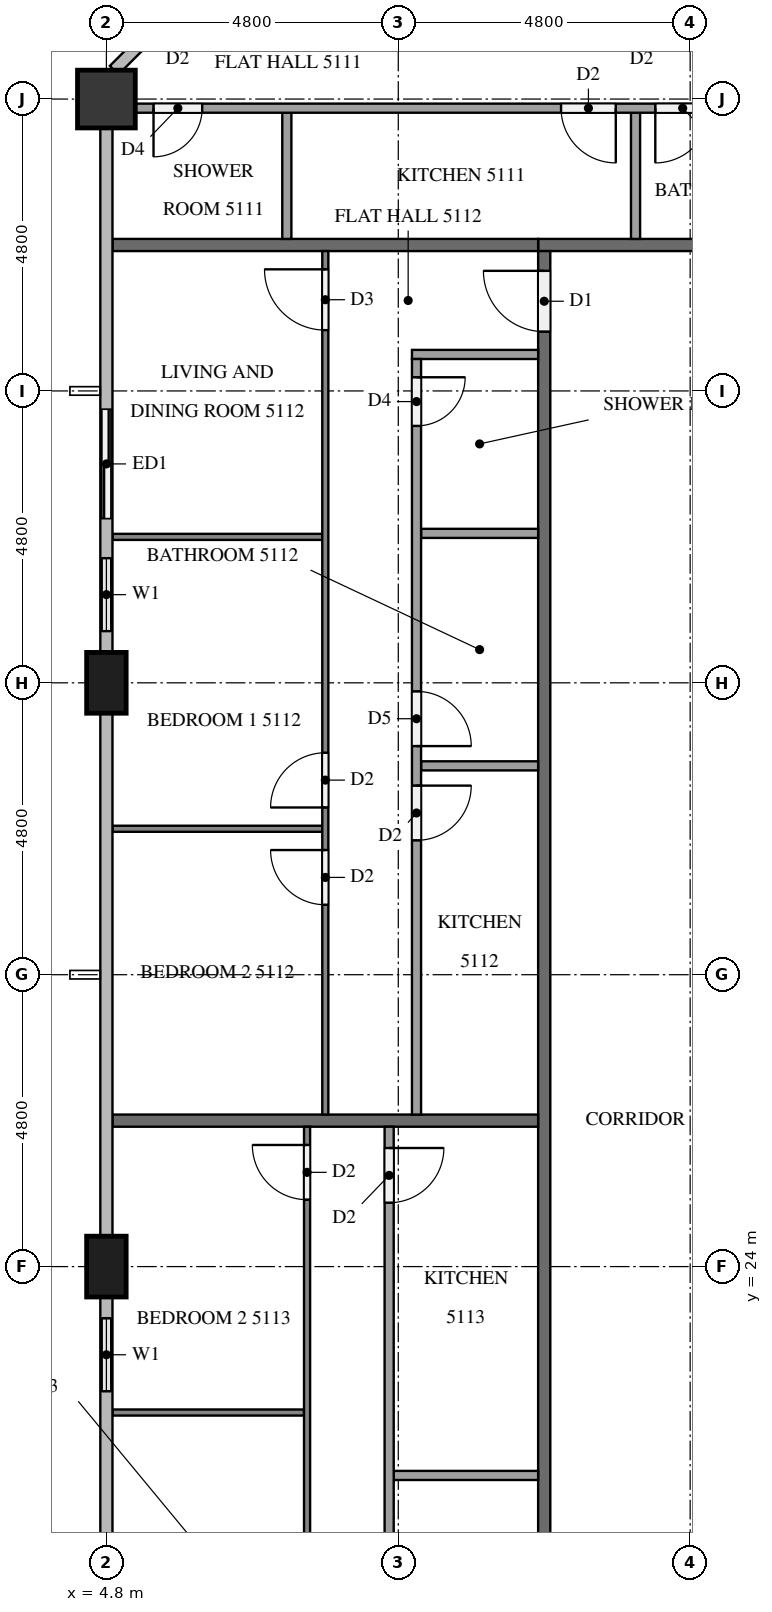
"""IFC4 building model, lengths in metres.
Left out: names, types, materials, properties, quantities, classifications, styles, units other than length and angle.
Written with IfcOpenShell. Run it as: python <this file> out.ifc"""

import sys

from ifc_helpers import new_model, si_unit, direction, frame, frame_2d, origin, origin_2d, place, context, subcontext, project, spatial, rectangle, extrude, element, fill, save


model = new_model("IFC4")
c1 = context("Model", 3, precision=1e-05, world=origin(), true_north=direction((0.0, 1.0)))
c2 = subcontext(c1, "Body", "Model", "MODEL_VIEW")
j1 = project(units=[si_unit("LENGTHUNIT", "METRE"), si_unit("PLANEANGLEUNIT", "RADIAN")], contexts=[c1])
p1 = place(None, origin())
s1 = spatial("IfcSite", under=j1, at=p1, CompositionType="ELEMENT")
p2 = place(p1, origin())
s2 = spatial("IfcBuilding", under=s1, at=p2, CompositionType="ELEMENT")
p3 = place(p2, frame((0.0, 0.0, 196.4)))
s3 = spatial("IfcBuildingStorey", under=s2, at=p3, CompositionType="ELEMENT", Elevation=196.4)
p4 = place(p3, frame((4.8, 43.2, 0.0), z_axis=(0.0, 0.0, 1.0), x_axis=(1.0, 0.0, 0.0)))
e1 = element("IfcColumn", 1, at=p4, inside=s3, PredefinedType="COLUMN", context=c2, shape_type="SweptSolid", body=[
    extrude(rectangle(XDim=0.95, YDim=0.95, at=origin_2d()), origin(), (0.0, 0.0, 1.0), 3.2),
])
for number, where, z_axis, x_axis in (
    (2, (4.8, 33.6, 0.0), (0.0, 0.0, 1.0), (0.0, 1.0, 0.0)),
    (3, (4.8, 24.0, 0.0), (0.0, 0.0, 1.0), (0.0, 1.0, 0.0)),
):
    element("IfcColumn", number, at=place(p3, frame(where, z_axis=z_axis, x_axis=x_axis)), inside=s3, PredefinedType="COLUMN", context=c2, shape_type="SweptSolid", body=[
        extrude(rectangle(XDim=1.0, YDim=0.65, at=origin_2d()), origin(), (0.0, 0.0, 1.0), 3.2),
    ])
p5 = place(p3, frame((4.8, 38.4, 0.0), z_axis=(0.0, 0.0, 1.0), x_axis=(0.0, -1.0, 0.0)))
e4 = element("IfcWall", 4, at=p5, inside=s3, PredefinedType="SOLIDWALL", context=c2, shape_type="SweptSolid", body=[
    extrude(rectangle(XDim=4.3, YDim=0.15, at=frame_2d((2.15, 0.0))), origin(), (0.0, 0.0, 1.0), 3.2),
])
p6 = place(p5, frame((0.3, 0.0, 0.0)))
e5 = element("IfcOpeningElement", 5, at=p6, cuts=e4, PredefinedType="OPENING", context=c2, shape_type="SweptSolid", body=[
    extrude(rectangle(XDim=1.8, YDim=2.4, at=frame_2d((0.9, 1.2))), frame((0.0, 0.085, 0.0), z_axis=(0.0, -1.0, 0.0), x_axis=(1.0, 0.0, 0.0)), (0.0, 0.0, 1.0), 0.17),
])
p7 = place(p5, frame((2.75, 0.0, 0.9)))
e6 = element("IfcOpeningElement", 6, at=p7, cuts=e4, PredefinedType="OPENING", context=c2, shape_type="SweptSolid", body=[
    extrude(rectangle(XDim=1.2, YDim=1.4, at=frame_2d((0.6, 0.7))), frame((0.0, 0.085, 0.0), z_axis=(0.0, -1.0, 0.0), x_axis=(1.0, 0.0, 0.0)), (0.0, 0.0, 1.0), 0.17),
])
p8 = place(p3, frame((4.8, 23.5, 0.0), z_axis=(0.0, 0.0, 1.0), x_axis=(0.0, -1.0, 0.0)))
e7 = element("IfcWall", 7, at=p8, inside=s3, PredefinedType="SOLIDWALL", context=c2, shape_type="SweptSolid", body=[
    extrude(rectangle(XDim=1.9, YDim=0.15, at=frame_2d((0.95, 0.0))), origin(), (0.0, 0.0, 1.0), 3.2),
])
p9 = place(p8, frame((0.35, 0.0, 0.9)))
e8 = element("IfcOpeningElement", 8, at=p9, cuts=e7, PredefinedType="OPENING", context=c2, shape_type="SweptSolid", body=[
    extrude(rectangle(XDim=1.2, YDim=1.4, at=frame_2d((0.6, 0.7))), frame((0.0, 0.085, 0.0), z_axis=(0.0, -1.0, 0.0), x_axis=(1.0, 0.0, 0.0)), (0.0, 0.0, 1.0), 0.17),
])
p10 = place(p3, frame((11.9, 40.8, 0.0), z_axis=(0.0, 0.0, 1.0), x_axis=(1.0, 0.0, 0.0)))
e9 = element("IfcWall", 9, at=p10, inside=s3, PredefinedType="PARTITIONING", context=c2, shape_type="SweptSolid", body=[
    extrude(rectangle(XDim=38.6, YDim=0.2, at=frame_2d((19.3, 0.0))), origin(), (0.0, 0.0, 1.0), 3.2),
])
p11 = place(p10, frame((34.125, 0.0, 0.0)))
e10 = element("IfcOpeningElement", 10, at=p11, cuts=e9, PredefinedType="OPENING", context=c2, shape_type="SweptSolid", body=[
    extrude(rectangle(XDim=1.0, YDim=2.1, at=frame_2d((0.5, 1.05))), frame((0.0, 0.11, 0.0), z_axis=(0.0, -1.0, 0.0), x_axis=(1.0, 0.0, 0.0)), (0.0, 0.0, 1.0), 0.22),
])
p12 = place(p10, frame((24.525, 0.0, 0.0)))
e11 = element("IfcOpeningElement", 11, at=p12, cuts=e9, PredefinedType="OPENING", context=c2, shape_type="SweptSolid", body=[
    extrude(rectangle(XDim=1.0, YDim=2.1, at=frame_2d((0.5, 1.05))), frame((0.0, 0.11, 0.0), z_axis=(0.0, -1.0, 0.0), x_axis=(1.0, 0.0, 0.0)), (0.0, 0.0, 1.0), 0.22),
])
p13 = place(p10, frame((7.725, 0.0, 0.0)))
e12 = element("IfcOpeningElement", 12, at=p13, cuts=e9, PredefinedType="OPENING", context=c2, shape_type="SweptSolid", body=[
    extrude(rectangle(XDim=1.0, YDim=2.1, at=frame_2d((0.5, 1.05))), frame((0.0, 0.11, 0.0), z_axis=(0.0, -1.0, 0.0), x_axis=(1.0, 0.0, 0.0)), (0.0, 0.0, 1.0), 0.22),
])
p14 = place(p10, frame((5.875, 0.0, 0.0)))
e13 = element("IfcOpeningElement", 13, at=p14, cuts=e9, PredefinedType="OPENING", context=c2, shape_type="SweptSolid", body=[
    extrude(rectangle(XDim=1.0, YDim=2.1, at=frame_2d((0.5, 1.05))), frame((0.0, 0.11, 0.0), z_axis=(0.0, -1.0, 0.0), x_axis=(1.0, 0.0, 0.0)), (0.0, 0.0, 1.0), 0.22),
])
p15 = place(p3, frame((12.0, 12.1, 0.0), z_axis=(0.0, 0.0, 1.0), x_axis=(0.0, 1.0, 0.0)))
e14 = element("IfcWall", 14, at=p15, inside=s3, PredefinedType="PARTITIONING", context=c2, shape_type="SweptSolid", body=[
    extrude(rectangle(XDim=28.6, YDim=0.2, at=frame_2d((14.3, 0.0))), origin(), (0.0, 0.0, 1.0), 3.2),
])
p16 = place(p15, frame((27.275, 0.0, 0.0)))
e15 = element("IfcOpeningElement", 15, at=p16, cuts=e14, PredefinedType="OPENING", context=c2, shape_type="SweptSolid", body=[
    extrude(rectangle(XDim=1.0, YDim=2.1, at=frame_2d((0.5, 1.05))), frame((0.0, 0.11, 0.0), z_axis=(0.0, -1.0, 0.0), x_axis=(1.0, 0.0, 0.0)), (0.0, 0.0, 1.0), 0.22),
])
p17 = place(p15, frame((0.325, 0.0, 0.0)))
e16 = element("IfcOpeningElement", 16, at=p17, cuts=e14, PredefinedType="OPENING", context=c2, shape_type="SweptSolid", body=[
    extrude(rectangle(XDim=1.0, YDim=2.1, at=frame_2d((0.5, 1.05))), frame((0.0, 0.11, 0.0), z_axis=(0.0, -1.0, 0.0), x_axis=(1.0, 0.0, 0.0)), (0.0, 0.0, 1.0), 0.22),
])
for number, where, z_axis, x_axis in (
    (17, (4.9, 40.8, 0.0), (0.0, 0.0, 1.0), (1.0, 0.0, 0.0)),
    (18, (4.9, 26.4, 0.0), (0.0, 0.0, 1.0), (1.0, 0.0, 0.0)),
):
    element("IfcWall", number, at=place(p3, frame(where, z_axis=z_axis, x_axis=x_axis)), inside=s3, PredefinedType="PARTITIONING", context=c2, shape_type="SweptSolid", body=[
        extrude(rectangle(XDim=7.0, YDim=0.2, at=frame_2d((3.5, 0.0))), origin(), (0.0, 0.0, 1.0), 3.2),
    ])
for number, where, z_axis, x_axis in (
    (19, (13.502, 40.9, 0.0), (0.0, 0.0, 1.0), (0.0, 1.0, 0.0)),
    (20, (7.767, 40.9, 0.0), (0.0, 0.0, 1.0), (0.0, 1.0, 0.0)),
):
    element("IfcWall", number, at=place(p3, frame(where, z_axis=z_axis, x_axis=x_axis)), inside=s3, PredefinedType="PARTITIONING", context=c2, shape_type="SweptSolid", body=[
        extrude(rectangle(XDim=2.075, YDim=0.15, at=frame_2d((1.038, 0.0))), origin(), (0.0, 0.0, 1.0), 3.2),
    ])
p18 = place(p3, frame((17.325, 43.05, 0.0), z_axis=(0.0, 0.0, 1.0), x_axis=(-1.0, 0.0, 0.0)))
e21 = element("IfcWall", 21, at=p18, inside=s3, PredefinedType="PARTITIONING", context=c2, shape_type="SweptSolid", body=[
    extrude(rectangle(XDim=12.05, YDim=0.15, at=frame_2d((6.025, 0.0))), origin(), (0.0, 0.0, 1.0), 3.2),
])
p19 = place(p18, frame((2.598, 0.0, 0.0)))
e22 = element("IfcOpeningElement", 22, at=p19, cuts=e21, PredefinedType="OPENING", context=c2, shape_type="SweptSolid", body=[
    extrude(rectangle(XDim=0.9, YDim=2.1, at=frame_2d((0.45, 1.05))), frame((0.0, 0.085, 0.0), z_axis=(0.0, -1.0, 0.0), x_axis=(1.0, 0.0, 0.0)), (0.0, 0.0, 1.0), 0.17),
])
p20 = place(p18, frame((4.148, 0.0, 0.0)))
e23 = element("IfcOpeningElement", 23, at=p20, cuts=e21, PredefinedType="OPENING", context=c2, shape_type="SweptSolid", body=[
    extrude(rectangle(XDim=0.9, YDim=2.1, at=frame_2d((0.45, 1.05))), frame((0.0, 0.085, 0.0), z_axis=(0.0, -1.0, 0.0), x_axis=(1.0, 0.0, 0.0)), (0.0, 0.0, 1.0), 0.17),
])
p21 = place(p18, frame((10.95, 0.0, 0.0)))
e24 = element("IfcOpeningElement", 24, at=p21, cuts=e21, PredefinedType="OPENING", context=c2, shape_type="SweptSolid", body=[
    extrude(rectangle(XDim=0.8, YDim=2.1, at=frame_2d((0.4, 1.05))), frame((0.0, 0.085, 0.0), z_axis=(0.0, -1.0, 0.0), x_axis=(1.0, 0.0, 0.0)), (0.0, 0.0, 1.0), 0.17),
])
for number, where, z_axis, x_axis in (
    (25, (8.35, 36.0, 0.0), (0.0, 0.0, 1.0), (-1.0, 0.0, 0.0)),
    (26, (8.35, 31.2, 0.0), (0.0, 0.0, 1.0), (-1.0, 0.0, 0.0)),
):
    element("IfcWall", number, at=place(p3, frame(where, z_axis=z_axis, x_axis=x_axis)), inside=s3, PredefinedType="PARTITIONING", context=c2, shape_type="SweptSolid", body=[
        extrude(rectangle(XDim=3.45, YDim=0.1, at=frame_2d((1.725, 0.0))), origin(), (0.0, 0.0, 1.0), 3.2),
    ])
p22 = place(p3, frame((8.4, 26.5, 0.0), z_axis=(0.0, 0.0, 1.0), x_axis=(0.0, 1.0, 0.0)))
e27 = element("IfcWall", 27, at=p22, inside=s3, PredefinedType="PARTITIONING", context=c2, shape_type="SweptSolid", body=[
    extrude(rectangle(XDim=14.2, YDim=0.1, at=frame_2d((7.1, 0.0))), origin(), (0.0, 0.0, 1.0), 3.2),
])
p23 = place(p22, frame((12.9, 0.0, 0.0)))
e28 = element("IfcOpeningElement", 28, at=p23, cuts=e27, PredefinedType="OPENING", context=c2, shape_type="SweptSolid", body=[
    extrude(rectangle(XDim=1.0, YDim=2.1, at=frame_2d((0.5, 1.05))), frame((0.0, 0.06, 0.0), z_axis=(0.0, -1.0, 0.0), x_axis=(1.0, 0.0, 0.0)), (0.0, 0.0, 1.0), 0.12),
])
p24 = place(p22, frame((5.05, 0.0, 0.0)))
e29 = element("IfcOpeningElement", 29, at=p24, cuts=e27, PredefinedType="OPENING", context=c2, shape_type="SweptSolid", body=[
    extrude(rectangle(XDim=0.9, YDim=2.1, at=frame_2d((0.45, 1.05))), frame((0.0, 0.06, 0.0), z_axis=(0.0, -1.0, 0.0), x_axis=(1.0, 0.0, 0.0)), (0.0, 0.0, 1.0), 0.12),
])
p25 = place(p22, frame((3.45, 0.0, 0.0)))
e30 = element("IfcOpeningElement", 30, at=p25, cuts=e27, PredefinedType="OPENING", context=c2, shape_type="SweptSolid", body=[
    extrude(rectangle(XDim=0.9, YDim=2.1, at=frame_2d((0.45, 1.05))), frame((0.0, 0.06, 0.0), z_axis=(0.0, -1.0, 0.0), x_axis=(1.0, 0.0, 0.0)), (0.0, 0.0, 1.0), 0.12),
])
for number, where, z_axis, x_axis in (
    (31, (11.9, 36.058, 0.0), (0.0, 0.0, 1.0), (-1.0, 0.0, 0.0)),
    (32, (11.9, 32.235, 0.0), (0.0, 0.0, 1.0), (-1.0, 0.0, 0.0)),
):
    element("IfcWall", number, at=place(p3, frame(where, z_axis=z_axis, x_axis=x_axis)), inside=s3, PredefinedType="PARTITIONING", context=c2, shape_type="SweptSolid", body=[
        extrude(rectangle(XDim=1.925, YDim=0.15, at=frame_2d((0.962, 0.0))), origin(), (0.0, 0.0, 1.0), 3.2),
    ])
p26 = place(p3, frame((11.9, 39.0, 0.0), z_axis=(0.0, 0.0, 1.0), x_axis=(-1.0, 0.0, 0.0)))
e33 = element("IfcWall", 33, at=p26, inside=s3, PredefinedType="PARTITIONING", context=c2, shape_type="SweptSolid", body=[
    extrude(rectangle(XDim=2.075, YDim=0.15, at=frame_2d((1.038, 0.0))), origin(), (0.0, 0.0, 1.0), 3.2),
])
p27 = place(p3, frame((9.9, 38.925, 0.0), z_axis=(0.0, 0.0, 1.0), x_axis=(0.0, -1.0, 0.0)))
e34 = element("IfcWall", 34, at=p27, inside=s3, PredefinedType="PARTITIONING", context=c2, shape_type="SweptSolid", body=[
    extrude(rectangle(XDim=12.425, YDim=0.15, at=frame_2d((6.212, 0.0))), origin(), (0.0, 0.0, 1.0), 3.2),
])
p28 = place(p27, frame((0.3, 0.0, 0.0)))
e35 = element("IfcOpeningElement", 35, at=p28, cuts=e34, PredefinedType="OPENING", context=c2, shape_type="SweptSolid", body=[
    extrude(rectangle(XDim=0.8, YDim=2.1, at=frame_2d((0.4, 1.05))), frame((0.0, 0.085, 0.0), z_axis=(0.0, -1.0, 0.0), x_axis=(1.0, 0.0, 0.0)), (0.0, 0.0, 1.0), 0.17),
])
p29 = place(p27, frame((5.465, 0.0, 0.0)))
e36 = element("IfcOpeningElement", 36, at=p29, cuts=e34, PredefinedType="OPENING", context=c2, shape_type="SweptSolid", body=[
    extrude(rectangle(XDim=0.9, YDim=2.1, at=frame_2d((0.45, 1.05))), frame((0.0, 0.085, 0.0), z_axis=(0.0, -1.0, 0.0), x_axis=(1.0, 0.0, 0.0)), (0.0, 0.0, 1.0), 0.17),
])
p30 = place(p27, frame((7.015, 0.0, 0.0)))
e37 = element("IfcOpeningElement", 37, at=p30, cuts=e34, PredefinedType="OPENING", context=c2, shape_type="SweptSolid", body=[
    extrude(rectangle(XDim=0.9, YDim=2.1, at=frame_2d((0.45, 1.05))), frame((0.0, 0.085, 0.0), z_axis=(0.0, -1.0, 0.0), x_axis=(1.0, 0.0, 0.0)), (0.0, 0.0, 1.0), 0.17),
])
p31 = place(p3, frame((8.05, 21.6, 0.0), z_axis=(0.0, 0.0, 1.0), x_axis=(-1.0, 0.0, 0.0)))
e38 = element("IfcWall", 38, at=p31, inside=s3, PredefinedType="PARTITIONING", context=c2, shape_type="SweptSolid", body=[
    extrude(rectangle(XDim=3.15, YDim=0.1, at=frame_2d((1.575, 0.0))), origin(), (0.0, 0.0, 1.0), 3.2),
])
p32 = place(p3, frame((8.1, 12.1, 0.0), z_axis=(0.0, 0.0, 1.0), x_axis=(0.0, 1.0, 0.0)))
e39 = element("IfcWall", 39, at=p32, inside=s3, PredefinedType="PARTITIONING", context=c2, shape_type="SweptSolid", body=[
    extrude(rectangle(XDim=14.2, YDim=0.1, at=frame_2d((7.1, 0.0))), origin(), (0.0, 0.0, 1.0), 3.2),
])
p33 = place(p32, frame((3.45, 0.0, 0.0)))
e40 = element("IfcOpeningElement", 40, at=p33, cuts=e39, PredefinedType="OPENING", context=c2, shape_type="SweptSolid", body=[
    extrude(rectangle(XDim=0.9, YDim=2.1, at=frame_2d((0.45, 1.05))), frame((0.0, 0.06, 0.0), z_axis=(0.0, -1.0, 0.0), x_axis=(1.0, 0.0, 0.0)), (0.0, 0.0, 1.0), 0.12),
])
p34 = place(p32, frame((5.05, 0.0, 0.0)))
e41 = element("IfcOpeningElement", 41, at=p34, cuts=e39, PredefinedType="OPENING", context=c2, shape_type="SweptSolid", body=[
    extrude(rectangle(XDim=1.0, YDim=2.1, at=frame_2d((0.5, 1.05))), frame((0.0, 0.06, 0.0), z_axis=(0.0, -1.0, 0.0), x_axis=(1.0, 0.0, 0.0)), (0.0, 0.0, 1.0), 0.12),
])
p35 = place(p32, frame((13.0, 0.0, 0.0)))
e42 = element("IfcOpeningElement", 42, at=p35, cuts=e39, PredefinedType="OPENING", context=c2, shape_type="SweptSolid", body=[
    extrude(rectangle(XDim=0.9, YDim=2.1, at=frame_2d((0.45, 1.05))), frame((0.0, 0.06, 0.0), z_axis=(0.0, -1.0, 0.0), x_axis=(1.0, 0.0, 0.0)), (0.0, 0.0, 1.0), 0.12),
])
p36 = place(p3, frame((11.9, 20.565, 0.0), z_axis=(0.0, 0.0, 1.0), x_axis=(-1.0, 0.0, 0.0)))
e43 = element("IfcWall", 43, at=p36, inside=s3, PredefinedType="PARTITIONING", context=c2, shape_type="SweptSolid", body=[
    extrude(rectangle(XDim=2.375, YDim=0.15, at=frame_2d((1.188, 0.0))), origin(), (0.0, 0.0, 1.0), 3.2),
])
p37 = place(p3, frame((9.45, 26.3, 0.0), z_axis=(0.0, 0.0, 1.0), x_axis=(0.0, -1.0, 0.0)))
e44 = element("IfcWall", 44, at=p37, inside=s3, PredefinedType="PARTITIONING", context=c2, shape_type="SweptSolid", body=[
    extrude(rectangle(XDim=12.425, YDim=0.15, at=frame_2d((6.212, 0.0))), origin(), (0.0, 0.0, 1.0), 3.2),
])
p38 = place(p37, frame((9.883, 0.0, 0.0)))
e45 = element("IfcOpeningElement", 45, at=p38, cuts=e44, PredefinedType="OPENING", context=c2, shape_type="SweptSolid", body=[
    extrude(rectangle(XDim=0.8, YDim=2.1, at=frame_2d((0.4, 1.05))), frame((0.0, 0.085, 0.0), z_axis=(0.0, -1.0, 0.0), x_axis=(1.0, 0.0, 0.0)), (0.0, 0.0, 1.0), 0.17),
])
p39 = place(p37, frame((8.333, 0.0, 0.0)))
e46 = element("IfcOpeningElement", 46, at=p39, cuts=e44, PredefinedType="OPENING", context=c2, shape_type="SweptSolid", body=[
    extrude(rectangle(XDim=0.9, YDim=2.1, at=frame_2d((0.45, 1.05))), frame((0.0, 0.085, 0.0), z_axis=(0.0, -1.0, 0.0), x_axis=(1.0, 0.0, 0.0)), (0.0, 0.0, 1.0), 0.17),
])
p40 = place(p37, frame((0.35, 0.0, 0.0)))
e47 = element("IfcOpeningElement", 47, at=p40, cuts=e44, PredefinedType="OPENING", context=c2, shape_type="SweptSolid", body=[
    extrude(rectangle(XDim=0.9, YDim=2.1, at=frame_2d((0.45, 1.05))), frame((0.0, 0.085, 0.0), z_axis=(0.0, -1.0, 0.0), x_axis=(1.0, 0.0, 0.0)), (0.0, 0.0, 1.0), 0.17),
])
p41 = place(p6, origin())
e48 = element("IfcDoor", 48, at=p41, inside=s3, OperationType="SLIDING_TO_RIGHT", PredefinedType="DOOR", context=c2, shape_type="SweptSolid", body=[
    extrude(rectangle(XDim=1.8, YDim=2.4, at=frame_2d((0.9, 1.2))), frame((0.0, 0.025, 0.0), z_axis=(0.0, -1.0, 0.0), x_axis=(1.0, 0.0, 0.0)), (0.0, 0.0, 1.0), 0.05),
])
fill(e5, e48)
p42 = place(p7, origin())
e49 = element("IfcWindow", 49, at=p42, inside=s3, PartitioningType="SINGLE_PANEL", PredefinedType="WINDOW", context=c2, shape_type="SweptSolid", body=[
    extrude(rectangle(XDim=1.2, YDim=1.4, at=frame_2d((0.6, 0.7))), frame((0.0, 0.03, 0.0), z_axis=(0.0, -1.0, 0.0), x_axis=(1.0, 0.0, 0.0)), (0.0, 0.0, 1.0), 0.06),
])
fill(e6, e49)
p43 = place(p9, origin())
e50 = element("IfcWindow", 50, at=p43, inside=s3, PartitioningType="SINGLE_PANEL", PredefinedType="WINDOW", context=c2, shape_type="SweptSolid", body=[
    extrude(rectangle(XDim=1.2, YDim=1.4, at=frame_2d((0.6, 0.7))), frame((0.0, 0.03, 0.0), z_axis=(0.0, -1.0, 0.0), x_axis=(1.0, 0.0, 0.0)), (0.0, 0.0, 1.0), 0.06),
])
fill(e8, e50)
p44 = place(p16, origin())
e51 = element("IfcDoor", 51, at=p44, inside=s3, OperationType="SINGLE_SWING_RIGHT", PredefinedType="DOOR", context=c2, shape_type="SweptSolid", body=[
    extrude(rectangle(XDim=1.0, YDim=2.1, at=frame_2d((0.5, 1.05))), frame((0.0, 0.025, 0.0), z_axis=(0.0, -1.0, 0.0), x_axis=(1.0, 0.0, 0.0)), (0.0, 0.0, 1.0), 0.05),
])
fill(e15, e51)
p45 = place(p19, origin())
e52 = element("IfcDoor", 52, at=p45, inside=s3, OperationType="SINGLE_SWING_RIGHT", PredefinedType="DOOR", context=c2, shape_type="SweptSolid", body=[
    extrude(rectangle(XDim=0.9, YDim=2.1, at=frame_2d((0.45, 1.05))), frame((0.0, 0.025, 0.0), z_axis=(0.0, -1.0, 0.0), x_axis=(1.0, 0.0, 0.0)), (0.0, 0.0, 1.0), 0.05),
])
fill(e22, e52)
p46 = place(p20, origin())
e53 = element("IfcDoor", 53, at=p46, inside=s3, OperationType="SINGLE_SWING_LEFT", PredefinedType="DOOR", context=c2, shape_type="SweptSolid", body=[
    extrude(rectangle(XDim=0.9, YDim=2.1, at=frame_2d((0.45, 1.05))), frame((0.0, 0.025, 0.0), z_axis=(0.0, -1.0, 0.0), x_axis=(1.0, 0.0, 0.0)), (0.0, 0.0, 1.0), 0.05),
])
fill(e23, e53)
p47 = place(p21, origin())
e54 = element("IfcDoor", 54, at=p47, inside=s3, OperationType="SINGLE_SWING_RIGHT", PredefinedType="DOOR", context=c2, shape_type="SweptSolid", body=[
    extrude(rectangle(XDim=0.8, YDim=2.1, at=frame_2d((0.4, 1.05))), frame((0.0, 0.025, 0.0), z_axis=(0.0, -1.0, 0.0), x_axis=(1.0, 0.0, 0.0)), (0.0, 0.0, 1.0), 0.05),
])
fill(e24, e54)
p48 = place(p23, origin())
e55 = element("IfcDoor", 55, at=p48, inside=s3, OperationType="SINGLE_SWING_RIGHT", PredefinedType="DOOR", context=c2, shape_type="SweptSolid", body=[
    extrude(rectangle(XDim=1.0, YDim=2.1, at=frame_2d((0.5, 1.05))), frame((0.0, 0.025, 0.0), z_axis=(0.0, -1.0, 0.0), x_axis=(1.0, 0.0, 0.0)), (0.0, 0.0, 1.0), 0.05),
])
fill(e28, e55)
p49 = place(p24, origin())
e56 = element("IfcDoor", 56, at=p49, inside=s3, OperationType="SINGLE_SWING_LEFT", PredefinedType="DOOR", context=c2, shape_type="SweptSolid", body=[
    extrude(rectangle(XDim=0.9, YDim=2.1, at=frame_2d((0.45, 1.05))), frame((0.0, 0.025, 0.0), z_axis=(0.0, -1.0, 0.0), x_axis=(1.0, 0.0, 0.0)), (0.0, 0.0, 1.0), 0.05),
])
fill(e29, e56)
p50 = place(p25, origin())
e57 = element("IfcDoor", 57, at=p50, inside=s3, OperationType="SINGLE_SWING_RIGHT", PredefinedType="DOOR", context=c2, shape_type="SweptSolid", body=[
    extrude(rectangle(XDim=0.9, YDim=2.1, at=frame_2d((0.45, 1.05))), frame((0.0, 0.025, 0.0), z_axis=(0.0, -1.0, 0.0), x_axis=(1.0, 0.0, 0.0)), (0.0, 0.0, 1.0), 0.05),
])
fill(e30, e57)
p51 = place(p28, origin())
e58 = element("IfcDoor", 58, at=p51, inside=s3, OperationType="SINGLE_SWING_LEFT", PredefinedType="DOOR", context=c2, shape_type="SweptSolid", body=[
    extrude(rectangle(XDim=0.8, YDim=2.1, at=frame_2d((0.4, 1.05))), frame((0.0, 0.025, 0.0), z_axis=(0.0, -1.0, 0.0), x_axis=(1.0, 0.0, 0.0)), (0.0, 0.0, 1.0), 0.05),
])
fill(e35, e58)
p52 = place(p29, origin())
e59 = element("IfcDoor", 59, at=p52, inside=s3, OperationType="SINGLE_SWING_RIGHT", PredefinedType="DOOR", context=c2, shape_type="SweptSolid", body=[
    extrude(rectangle(XDim=0.9, YDim=2.1, at=frame_2d((0.45, 1.05))), frame((0.0, 0.025, 0.0), z_axis=(0.0, -1.0, 0.0), x_axis=(1.0, 0.0, 0.0)), (0.0, 0.0, 1.0), 0.05),
])
fill(e36, e59)
p53 = place(p30, origin())
e60 = element("IfcDoor", 60, at=p53, inside=s3, OperationType="SINGLE_SWING_LEFT", PredefinedType="DOOR", context=c2, shape_type="SweptSolid", body=[
    extrude(rectangle(XDim=0.9, YDim=2.1, at=frame_2d((0.45, 1.05))), frame((0.0, 0.025, 0.0), z_axis=(0.0, -1.0, 0.0), x_axis=(1.0, 0.0, 0.0)), (0.0, 0.0, 1.0), 0.05),
])
fill(e37, e60)
p54 = place(p35, origin())
e61 = element("IfcDoor", 61, at=p54, inside=s3, OperationType="SINGLE_SWING_RIGHT", PredefinedType="DOOR", context=c2, shape_type="SweptSolid", body=[
    extrude(rectangle(XDim=0.9, YDim=2.1, at=frame_2d((0.45, 1.05))), frame((0.0, 0.025, 0.0), z_axis=(0.0, -1.0, 0.0), x_axis=(1.0, 0.0, 0.0)), (0.0, 0.0, 1.0), 0.05),
])
fill(e42, e61)
p55 = place(p40, origin())
e62 = element("IfcDoor", 62, at=p55, inside=s3, OperationType="SINGLE_SWING_LEFT", PredefinedType="DOOR", context=c2, shape_type="SweptSolid", body=[
    extrude(rectangle(XDim=0.9, YDim=2.1, at=frame_2d((0.45, 1.05))), frame((0.0, 0.025, 0.0), z_axis=(0.0, -1.0, 0.0), x_axis=(1.0, 0.0, 0.0)), (0.0, 0.0, 1.0), 0.05),
])
fill(e47, e62)
save(model, sys.argv[1])
